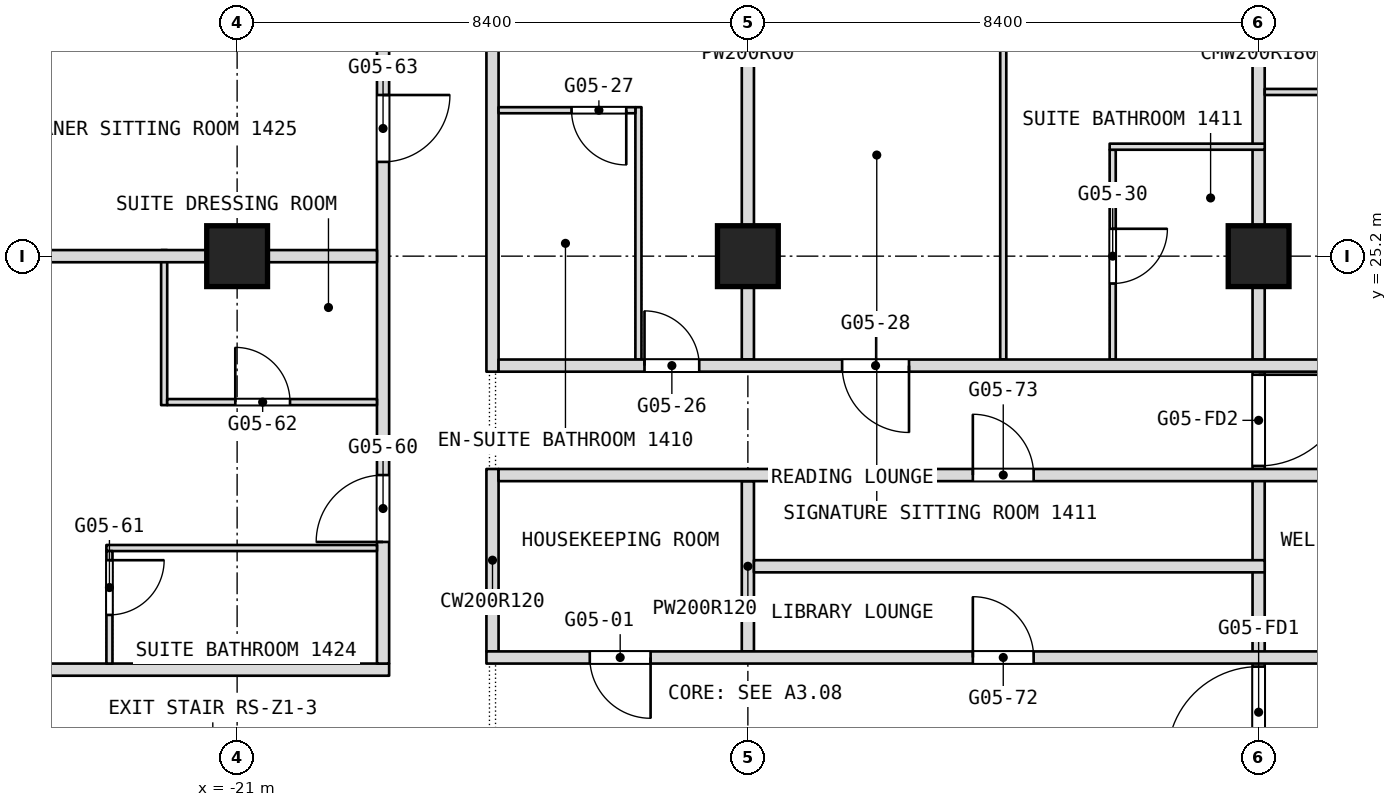
"""IFC4 building model, lengths in metres.
Left out: names, types, materials, properties, quantities, classifications, styles, units other than length and angle.
Written with IfcOpenShell. Run it as: python <this file> out.ifc"""

import sys

from ifc_helpers import new_model, si_unit, direction, frame, frame_2d, origin, origin_2d, place, context, subcontext, project, spatial, rectangle, extrude, element, fill, save


model = new_model("IFC4")
c1 = context("Model", 3, precision=1e-05, world=origin(), true_north=direction((0.0, 1.0)))
c2 = subcontext(c1, "Body", "Model", "MODEL_VIEW")
j1 = project(units=[si_unit("LENGTHUNIT", "METRE"), si_unit("PLANEANGLEUNIT", "RADIAN")], contexts=[c1])
p1 = place(None, origin())
s1 = spatial("IfcSite", under=j1, at=p1, CompositionType="ELEMENT")
p2 = place(p1, origin())
s2 = spatial("IfcBuilding", under=s1, at=p2, CompositionType="ELEMENT")
p3 = place(p2, frame((0.0, 0.0, 65.3)))
s3 = spatial("IfcBuildingStorey", under=s2, at=p3, CompositionType="ELEMENT", Elevation=65.3)
for number, where, z_axis, x_axis in (
    (1, (-21.0, 25.2, 0.0), (0.0, 0.0, 1.0), (1.0, 0.0, 0.0)),
    (2, (-12.6, 25.2, 0.0), (0.0, 0.0, 1.0), (1.0, 0.0, 0.0)),
    (3, (-4.2, 25.2, 0.0), (0.0, 0.0, 1.0), (1.0, 0.0, 0.0)),
):
    element("IfcColumn", number, at=place(p3, frame(where, z_axis=z_axis, x_axis=x_axis)), inside=s3, PredefinedType="COLUMN", context=c2, shape_type="SweptSolid", body=[
        extrude(rectangle(XDim=1.0, YDim=1.0, at=origin_2d()), origin(), (0.0, 0.0, 1.0), 3.6),
    ])
p4 = place(p3, frame((-4.2, 16.8, 0.0), z_axis=(0.0, 0.0, 1.0), x_axis=(0.0, 1.0, 0.0)))
e4 = element("IfcWall", 4, at=p4, inside=s3, PredefinedType="PARTITIONING", context=c2, shape_type="SweptSolid", body=[
    extrude(rectangle(XDim=6.7, YDim=0.2, at=frame_2d((3.35, 0.0))), origin(), (0.0, 0.0, 1.0), 3.34),
])
p5 = place(p4, frame((0.15, 0.0, 0.0)))
e5 = element("IfcOpeningElement", 5, at=p5, cuts=e4, PredefinedType="OPENING", context=c2, shape_type="SweptSolid", body=[
    extrude(rectangle(XDim=1.5, YDim=2.1, at=frame_2d((0.75, 1.05))), frame((0.0, 0.1, 0.0), z_axis=(0.0, -1.0, 0.0), x_axis=(1.0, 0.0, 0.0)), (0.0, 0.0, 1.0), 0.2),
])
p6 = place(p4, frame((4.95, 0.0, 0.0)))
e6 = element("IfcOpeningElement", 6, at=p6, cuts=e4, PredefinedType="OPENING", context=c2, shape_type="SweptSolid", body=[
    extrude(rectangle(XDim=1.5, YDim=2.1, at=frame_2d((0.75, 1.05))), frame((0.0, 0.1, 0.0), z_axis=(0.0, -1.0, 0.0), x_axis=(1.0, 0.0, 0.0)), (0.0, 0.0, 1.0), 0.2),
])
p7 = place(p3, frame((-4.2, 23.5, 0.0), z_axis=(0.0, 0.0, 1.0), x_axis=(0.0, 1.0, 0.0)))
e7 = element("IfcWall", 7, at=p7, inside=s3, PredefinedType="PARTITIONING", context=c2, shape_type="SweptSolid", body=[
    extrude(rectangle(XDim=10.04, YDim=0.2, at=frame_2d((5.02, 0.0))), origin(), (0.0, 0.0, 1.0), 3.34),
])
p8 = place(p3, frame((-6.6, 23.5, 0.0), z_axis=(0.0, 0.0, 1.0), x_axis=(0.0, 1.0, 0.0)))
e8 = element("IfcWall", 8, at=p8, inside=s3, PredefinedType="PARTITIONING", context=c2, shape_type="SweptSolid", body=[
    extrude(rectangle(XDim=3.45, YDim=0.1, at=frame_2d((1.725, 0.0))), origin(), (0.0, 0.0, 1.0), 3.34),
])
p9 = place(p8, frame((1.25, 0.0, 0.0)))
e9 = element("IfcOpeningElement", 9, at=p9, cuts=e8, PredefinedType="OPENING", context=c2, shape_type="SweptSolid", body=[
    extrude(rectangle(XDim=0.9, YDim=2.1, at=frame_2d((0.45, 1.05))), frame((0.0, 0.05, 0.0), z_axis=(0.0, -1.0, 0.0), x_axis=(1.0, 0.0, 0.0)), (0.0, 0.0, 1.0), 0.1),
])
p10 = place(p3, frame((-8.4, 23.5, 0.0), z_axis=(0.0, 0.0, 1.0), x_axis=(0.0, 1.0, 0.0)))
e10 = element("IfcWall", 10, at=p10, inside=s3, PredefinedType="PARTITIONING", context=c2, shape_type="SweptSolid", body=[
    extrude(rectangle(XDim=10.04, YDim=0.1, at=frame_2d((5.02, 0.0))), origin(), (0.0, 0.0, 1.0), 3.34),
])
p11 = place(p10, frame((5.57, 0.0, 0.0)))
e11 = element("IfcOpeningElement", 11, at=p11, cuts=e10, PredefinedType="OPENING", context=c2, shape_type="SweptSolid", body=[
    extrude(rectangle(XDim=0.9, YDim=2.1, at=frame_2d((0.45, 1.05))), frame((0.0, 0.05, 0.0), z_axis=(0.0, -1.0, 0.0), x_axis=(1.0, 0.0, 0.0)), (0.0, 0.0, 1.0), 0.1),
])
p12 = place(p3, frame((-12.6, 18.7, 0.0), z_axis=(0.0, 0.0, 1.0), x_axis=(0.0, 1.0, 0.0)))
e12 = element("IfcWall", 12, at=p12, inside=s3, PredefinedType="PARTITIONING", context=c2, shape_type="SweptSolid", body=[
    extrude(rectangle(XDim=2.8, YDim=0.2, at=frame_2d((1.4, 0.0))), origin(), (0.0, 0.0, 1.0), 3.34),
])
p13 = place(p3, frame((-12.6, 23.5, 0.0), z_axis=(0.0, 0.0, 1.0), x_axis=(0.0, 1.0, 0.0)))
e13 = element("IfcWall", 13, at=p13, inside=s3, PredefinedType="PARTITIONING", context=c2, shape_type="SweptSolid", body=[
    extrude(rectangle(XDim=10.04, YDim=0.2, at=frame_2d((5.02, 0.0))), origin(), (0.0, 0.0, 1.0), 3.34),
])
p14 = place(p3, frame((-14.4, 23.5, 0.0), z_axis=(0.0, 0.0, 1.0), x_axis=(0.0, 1.0, 0.0)))
e14 = element("IfcWall", 14, at=p14, inside=s3, PredefinedType="PARTITIONING", context=c2, shape_type="SweptSolid", body=[
    extrude(rectangle(XDim=4.15, YDim=0.1, at=frame_2d((2.075, 0.0))), origin(), (0.0, 0.0, 1.0), 3.34),
])
p15 = place(p3, frame((-16.8, 18.7, 0.0), z_axis=(0.0, 0.0, 1.0), x_axis=(0.0, 1.0, 0.0)))
e15 = element("IfcWall", 15, at=p15, inside=s3, PredefinedType="PARTITIONING", context=c2, shape_type="SweptSolid", body=[
    extrude(rectangle(XDim=3.0, YDim=0.2, at=frame_2d((1.5, 0.0))), origin(), (0.0, 0.0, 1.0), 3.34),
])
p16 = place(p3, frame((-16.8, 23.3, 0.0), z_axis=(0.0, 0.0, 1.0), x_axis=(0.0, 1.0, 0.0)))
e16 = element("IfcWall", 16, at=p16, inside=s3, PredefinedType="PARTITIONING", context=c2, shape_type="SweptSolid", body=[
    extrude(rectangle(XDim=10.24, YDim=0.2, at=frame_2d((5.12, 0.0))), origin(), (0.0, 0.0, 1.0), 3.34),
])
p17 = place(p3, frame((-24.5, 18.4, 0.0), z_axis=(0.0, 0.0, 1.0), x_axis=(1.0, 0.0, 0.0)))
e17 = element("IfcWall", 17, at=p17, inside=s3, PredefinedType="PARTITIONING", context=c2, shape_type="SweptSolid", body=[
    extrude(rectangle(XDim=6.0, YDim=0.2, at=frame_2d((3.0, 0.0))), origin(), (0.0, 0.0, 1.0), 3.34),
])
p18 = place(p3, frame((-18.6, 18.5, 0.0), z_axis=(0.0, 0.0, 1.0), x_axis=(0.0, 1.0, 0.0)))
e18 = element("IfcWall", 18, at=p18, inside=s3, PredefinedType="PARTITIONING", context=c2, shape_type="SweptSolid", body=[
    extrude(rectangle(XDim=15.04, YDim=0.2, at=frame_2d((7.52, 0.0))), origin(), (0.0, 0.0, 1.0), 3.34),
])
p19 = place(p18, frame((2.0, 0.0, 0.0)))
e19 = element("IfcOpeningElement", 19, at=p19, cuts=e18, PredefinedType="OPENING", context=c2, shape_type="SweptSolid", body=[
    extrude(rectangle(XDim=1.1, YDim=2.1, at=frame_2d((0.55, 1.05))), frame((0.0, 0.1, 0.0), z_axis=(0.0, -1.0, 0.0), x_axis=(1.0, 0.0, 0.0)), (0.0, 0.0, 1.0), 0.2),
])
p20 = place(p18, frame((8.25, 0.0, 0.0)))
e20 = element("IfcOpeningElement", 20, at=p20, cuts=e18, PredefinedType="OPENING", context=c2, shape_type="SweptSolid", body=[
    extrude(rectangle(XDim=1.1, YDim=2.1, at=frame_2d((0.55, 1.05))), frame((0.0, 0.1, 0.0), z_axis=(0.0, -1.0, 0.0), x_axis=(1.0, 0.0, 0.0)), (0.0, 0.0, 1.0), 0.2),
])
p21 = place(p3, frame((-16.9, 18.6, 0.0), z_axis=(0.0, 0.0, 1.0), x_axis=(1.0, 0.0, 0.0)))
e21 = element("IfcWall", 21, at=p21, inside=s3, PredefinedType="PARTITIONING", context=c2, shape_type="SweptSolid", body=[
    extrude(rectangle(XDim=25.1, YDim=0.2, at=frame_2d((12.55, 0.0))), origin(), (0.0, 0.0, 1.0), 3.34),
])
p22 = place(p21, frame((1.7, 0.0, 0.0)))
e22 = element("IfcOpeningElement", 22, at=p22, cuts=e21, PredefinedType="OPENING", context=c2, shape_type="SweptSolid", body=[
    extrude(rectangle(XDim=1.0, YDim=2.1, at=frame_2d((0.5, 1.05))), frame((0.0, 0.1, 0.0), z_axis=(0.0, -1.0, 0.0), x_axis=(1.0, 0.0, 0.0)), (0.0, 0.0, 1.0), 0.2),
])
p23 = place(p21, frame((8.0, 0.0, 0.0)))
e23 = element("IfcOpeningElement", 23, at=p23, cuts=e21, PredefinedType="OPENING", context=c2, shape_type="SweptSolid", body=[
    extrude(rectangle(XDim=1.0, YDim=2.1, at=frame_2d((0.5, 1.05))), frame((0.0, 0.1, 0.0), z_axis=(0.0, -1.0, 0.0), x_axis=(1.0, 0.0, 0.0)), (0.0, 0.0, 1.0), 0.2),
])
p24 = place(p21, frame((22.55, 0.0, 0.0)))
e24 = element("IfcOpeningElement", 24, at=p24, cuts=e21, PredefinedType="OPENING", context=c2, shape_type="SweptSolid", body=[
    extrude(rectangle(XDim=1.0, YDim=2.1, at=frame_2d((0.5, 1.05))), frame((0.0, 0.1, 0.0), z_axis=(0.0, -1.0, 0.0), x_axis=(1.0, 0.0, 0.0)), (0.0, 0.0, 1.0), 0.2),
])
p25 = place(p21, frame((14.3, 0.0, 0.0)))
e25 = element("IfcOpeningElement", 25, at=p25, cuts=e21, PredefinedType="OPENING", context=c2, shape_type="SweptSolid", body=[
    extrude(rectangle(XDim=1.0, YDim=2.1, at=frame_2d((0.5, 1.05))), frame((0.0, 0.1, 0.0), z_axis=(0.0, -1.0, 0.0), x_axis=(1.0, 0.0, 0.0)), (0.0, 0.0, 1.0), 0.2),
])
p26 = place(p21, frame((18.5, 0.0, 0.0)))
e26 = element("IfcOpeningElement", 26, at=p26, cuts=e21, PredefinedType="OPENING", context=c2, shape_type="SweptSolid", body=[
    extrude(rectangle(XDim=1.0, YDim=2.1, at=frame_2d((0.5, 1.05))), frame((0.0, 0.1, 0.0), z_axis=(0.0, -1.0, 0.0), x_axis=(1.0, 0.0, 0.0)), (0.0, 0.0, 1.0), 0.2),
])
p27 = place(p3, frame((-12.5, 20.1, 0.0), z_axis=(0.0, 0.0, 1.0), x_axis=(1.0, 0.0, 0.0)))
e27 = element("IfcWall", 27, at=p27, inside=s3, PredefinedType="PARTITIONING", context=c2, shape_type="SweptSolid", body=[
    extrude(rectangle(XDim=8.4, YDim=0.2, at=frame_2d((4.2, 0.0))), origin(), (0.0, 0.0, 1.0), 3.34),
])
p28 = place(p3, frame((-23.15, 20.4, 0.0), z_axis=(0.0, 0.0, 1.0), x_axis=(1.0, 0.0, 0.0)))
e28 = element("IfcWall", 28, at=p28, inside=s3, PredefinedType="PARTITIONING", context=c2, shape_type="SweptSolid", body=[
    extrude(rectangle(XDim=4.45, YDim=0.1, at=frame_2d((2.225, 0.0))), origin(), (0.0, 0.0, 1.0), 3.34),
])
p29 = place(p3, frame((-16.7, 21.6, 0.0), z_axis=(0.0, 0.0, 1.0), x_axis=(1.0, 0.0, 0.0)))
e29 = element("IfcWall", 29, at=p29, inside=s3, PredefinedType="PARTITIONING", context=c2, shape_type="SweptSolid", body=[
    extrude(rectangle(XDim=24.7, YDim=0.2, at=frame_2d((12.35, 0.0))), origin(), (0.0, 0.0, 1.0), 3.34),
])
p30 = place(p29, frame((7.8, 0.0, 0.0)))
e30 = element("IfcOpeningElement", 30, at=p30, cuts=e29, PredefinedType="OPENING", context=c2, shape_type="SweptSolid", body=[
    extrude(rectangle(XDim=1.0, YDim=2.1, at=frame_2d((0.5, 1.05))), frame((0.0, 0.1, 0.0), z_axis=(0.0, -1.0, 0.0), x_axis=(1.0, 0.0, 0.0)), (0.0, 0.0, 1.0), 0.2),
])
p31 = place(p29, frame((22.25, 0.0, 0.0)))
e31 = element("IfcOpeningElement", 31, at=p31, cuts=e29, PredefinedType="OPENING", context=c2, shape_type="SweptSolid", body=[
    extrude(rectangle(XDim=1.0, YDim=2.1, at=frame_2d((0.5, 1.05))), frame((0.0, 0.1, 0.0), z_axis=(0.0, -1.0, 0.0), x_axis=(1.0, 0.0, 0.0)), (0.0, 0.0, 1.0), 0.2),
])
p32 = place(p3, frame((-22.2, 22.75, 0.0), z_axis=(0.0, 0.0, 1.0), x_axis=(0.0, 1.0, 0.0)))
e32 = element("IfcWall", 32, at=p32, inside=s3, PredefinedType="PARTITIONING", context=c2, shape_type="SweptSolid", body=[
    extrude(rectangle(XDim=2.55, YDim=0.1, at=frame_2d((1.275, 0.0))), origin(), (0.0, 0.0, 1.0), 3.34),
])
p33 = place(p3, frame((-22.15, 22.8, 0.0), z_axis=(0.0, 0.0, 1.0), x_axis=(1.0, 0.0, 0.0)))
e33 = element("IfcWall", 33, at=p33, inside=s3, PredefinedType="PARTITIONING", context=c2, shape_type="SweptSolid", body=[
    extrude(rectangle(XDim=3.45, YDim=0.1, at=frame_2d((1.725, 0.0))), origin(), (0.0, 0.0, 1.0), 3.34),
])
p34 = place(p33, frame((1.12, 0.0, 0.0)))
e34 = element("IfcOpeningElement", 34, at=p34, cuts=e33, PredefinedType="OPENING", context=c2, shape_type="SweptSolid", body=[
    extrude(rectangle(XDim=0.9, YDim=2.1, at=frame_2d((0.45, 1.05))), frame((0.0, 0.05, 0.0), z_axis=(0.0, -1.0, 0.0), x_axis=(1.0, 0.0, 0.0)), (0.0, 0.0, 1.0), 0.1),
])
p35 = place(p3, frame((-23.1, 18.5, 0.0), z_axis=(0.0, 0.0, 1.0), x_axis=(0.0, 1.0, 0.0)))
e35 = element("IfcWall", 35, at=p35, inside=s3, PredefinedType="PARTITIONING", context=c2, shape_type="SweptSolid", body=[
    extrude(rectangle(XDim=1.85, YDim=0.1, at=frame_2d((0.925, 0.0))), origin(), (0.0, 0.0, 1.0), 3.34),
])
p36 = place(p35, frame((0.8, 0.0, 0.0)))
e36 = element("IfcOpeningElement", 36, at=p36, cuts=e35, PredefinedType="OPENING", context=c2, shape_type="SweptSolid", body=[
    extrude(rectangle(XDim=0.9, YDim=2.1, at=frame_2d((0.45, 1.05))), frame((0.0, 0.05, 0.0), z_axis=(0.0, -1.0, 0.0), x_axis=(1.0, 0.0, 0.0)), (0.0, 0.0, 1.0), 0.1),
])
p37 = place(p3, frame((-16.7, 23.4, 0.0), z_axis=(0.0, 0.0, 1.0), x_axis=(1.0, 0.0, 0.0)))
e37 = element("IfcWall", 37, at=p37, inside=s3, PredefinedType="PARTITIONING", context=c2, shape_type="SweptSolid", body=[
    extrude(rectangle(XDim=23.4, YDim=0.2, at=frame_2d((11.7, 0.0))), origin(), (0.0, 0.0, 1.0), 3.34),
])
p38 = place(p37, frame((2.4, 0.0, 0.0)))
e38 = element("IfcOpeningElement", 38, at=p38, cuts=e37, PredefinedType="OPENING", context=c2, shape_type="SweptSolid", body=[
    extrude(rectangle(XDim=0.9, YDim=2.1, at=frame_2d((0.45, 1.05))), frame((0.0, 0.1, 0.0), z_axis=(0.0, -1.0, 0.0), x_axis=(1.0, 0.0, 0.0)), (0.0, 0.0, 1.0), 0.2),
])
p39 = place(p37, frame((5.65, 0.0, 0.0)))
e39 = element("IfcOpeningElement", 39, at=p39, cuts=e37, PredefinedType="OPENING", context=c2, shape_type="SweptSolid", body=[
    extrude(rectangle(XDim=1.1, YDim=2.1, at=frame_2d((0.55, 1.05))), frame((0.0, 0.1, 0.0), z_axis=(0.0, -1.0, 0.0), x_axis=(1.0, 0.0, 0.0)), (0.0, 0.0, 1.0), 0.2),
])
p40 = place(p37, frame((16.2, 0.0, 0.0)))
e40 = element("IfcOpeningElement", 40, at=p40, cuts=e37, PredefinedType="OPENING", context=c2, shape_type="SweptSolid", body=[
    extrude(rectangle(XDim=1.1, YDim=2.1, at=frame_2d((0.55, 1.05))), frame((0.0, 0.1, 0.0), z_axis=(0.0, -1.0, 0.0), x_axis=(1.0, 0.0, 0.0)), (0.0, 0.0, 1.0), 0.2),
])
p41 = place(p3, frame((-29.7, 25.2, 0.0), z_axis=(0.0, 0.0, 1.0), x_axis=(1.0, 0.0, 0.0)))
e41 = element("IfcWall", 41, at=p41, inside=s3, PredefinedType="PARTITIONING", context=c2, shape_type="SweptSolid", body=[
    extrude(rectangle(XDim=11.0, YDim=0.2, at=frame_2d((5.5, 0.0))), origin(), (0.0, 0.0, 1.0), 2.84),
])
p42 = place(p3, frame((-6.65, 27.0, 0.0), z_axis=(0.0, 0.0, 1.0), x_axis=(1.0, 0.0, 0.0)))
e42 = element("IfcWall", 42, at=p42, inside=s3, PredefinedType="PARTITIONING", context=c2, shape_type="SweptSolid", body=[
    extrude(rectangle(XDim=2.55, YDim=0.1, at=frame_2d((1.275, 0.0))), origin(), (0.0, 0.0, 1.0), 3.34),
])
p43 = place(p3, frame((-16.7, 27.6, 0.0), z_axis=(0.0, 0.0, 1.0), x_axis=(1.0, 0.0, 0.0)))
e43 = element("IfcWall", 43, at=p43, inside=s3, PredefinedType="PARTITIONING", context=c2, shape_type="SweptSolid", body=[
    extrude(rectangle(XDim=2.25, YDim=0.1, at=frame_2d((1.125, 0.0))), origin(), (0.0, 0.0, 1.0), 3.34),
])
p44 = place(p43, frame((1.2, 0.0, 0.0)))
e44 = element("IfcOpeningElement", 44, at=p44, cuts=e43, PredefinedType="OPENING", context=c2, shape_type="SweptSolid", body=[
    extrude(rectangle(XDim=0.9, YDim=2.1, at=frame_2d((0.45, 1.05))), frame((0.0, 0.05, 0.0), z_axis=(0.0, -1.0, 0.0), x_axis=(1.0, 0.0, 0.0)), (0.0, 0.0, 1.0), 0.1),
])
p45 = place(p3, frame((-4.1, 27.9, 0.0), z_axis=(0.0, 0.0, 1.0), x_axis=(1.0, 0.0, 0.0)))
e45 = element("IfcWall", 45, at=p45, inside=s3, PredefinedType="PARTITIONING", context=c2, shape_type="SweptSolid", body=[
    extrude(rectangle(XDim=3.45, YDim=0.1, at=frame_2d((1.725, 0.0))), origin(), (0.0, 0.0, 1.0), 3.34),
])
p46 = place(p45, frame((2.4, 0.0, 0.0)))
e46 = element("IfcOpeningElement", 46, at=p46, cuts=e45, PredefinedType="OPENING", context=c2, shape_type="SweptSolid", body=[
    extrude(rectangle(XDim=0.9, YDim=2.1, at=frame_2d((0.45, 1.05))), frame((0.0, 0.05, 0.0), z_axis=(0.0, -1.0, 0.0), x_axis=(1.0, 0.0, 0.0)), (0.0, 0.0, 1.0), 0.1),
])
p47 = place(p9, origin())
e47 = element("IfcDoor", 47, at=p47, inside=s3, OperationType="SINGLE_SWING_RIGHT", PredefinedType="DOOR", context=c2, shape_type="SweptSolid", body=[
    extrude(rectangle(XDim=0.9, YDim=2.1, at=frame_2d((0.45, 1.05))), frame((0.0, 0.025, 0.0), z_axis=(0.0, -1.0, 0.0), x_axis=(1.0, 0.0, 0.0)), (0.0, 0.0, 1.0), 0.05),
])
fill(e9, e47)
p48 = place(p19, origin())
e48 = element("IfcDoor", 48, at=p48, inside=s3, OperationType="SINGLE_SWING_LEFT", PredefinedType="DOOR", context=c2, shape_type="SweptSolid", body=[
    extrude(rectangle(XDim=1.1, YDim=2.1, at=frame_2d((0.55, 1.05))), frame((0.0, 0.025, 0.0), z_axis=(0.0, -1.0, 0.0), x_axis=(1.0, 0.0, 0.0)), (0.0, 0.0, 1.0), 0.05),
])
fill(e19, e48)
p49 = place(p20, origin())
e49 = element("IfcDoor", 49, at=p49, inside=s3, OperationType="SINGLE_SWING_RIGHT", PredefinedType="DOOR", context=c2, shape_type="SweptSolid", body=[
    extrude(rectangle(XDim=1.1, YDim=2.1, at=frame_2d((0.55, 1.05))), frame((0.0, 0.025, 0.0), z_axis=(0.0, -1.0, 0.0), x_axis=(1.0, 0.0, 0.0)), (0.0, 0.0, 1.0), 0.05),
])
fill(e20, e49)
p50 = place(p22, origin())
e50 = element("IfcDoor", 50, at=p50, inside=s3, OperationType="SINGLE_SWING_RIGHT", PredefinedType="DOOR", context=c2, shape_type="SweptSolid", body=[
    extrude(rectangle(XDim=1.0, YDim=2.1, at=frame_2d((0.5, 1.05))), frame((0.0, 0.025, 0.0), z_axis=(0.0, -1.0, 0.0), x_axis=(1.0, 0.0, 0.0)), (0.0, 0.0, 1.0), 0.05),
])
fill(e22, e50)
p51 = place(p23, origin())
e51 = element("IfcDoor", 51, at=p51, inside=s3, OperationType="SINGLE_SWING_RIGHT", PredefinedType="DOOR", context=c2, shape_type="SweptSolid", body=[
    extrude(rectangle(XDim=1.0, YDim=2.1, at=frame_2d((0.5, 1.05))), frame((0.0, 0.025, 0.0), z_axis=(0.0, -1.0, 0.0), x_axis=(1.0, 0.0, 0.0)), (0.0, 0.0, 1.0), 0.05),
])
fill(e23, e51)
p52 = place(p30, origin())
e52 = element("IfcDoor", 52, at=p52, inside=s3, OperationType="SINGLE_SWING_RIGHT", PredefinedType="DOOR", context=c2, shape_type="SweptSolid", body=[
    extrude(rectangle(XDim=1.0, YDim=2.1, at=frame_2d((0.5, 1.05))), frame((0.0, 0.025, 0.0), z_axis=(0.0, -1.0, 0.0), x_axis=(1.0, 0.0, 0.0)), (0.0, 0.0, 1.0), 0.05),
])
fill(e30, e52)
p53 = place(p34, origin())
e53 = element("IfcDoor", 53, at=p53, inside=s3, OperationType="SINGLE_SWING_LEFT", PredefinedType="DOOR", context=c2, shape_type="SweptSolid", body=[
    extrude(rectangle(XDim=0.9, YDim=2.1, at=frame_2d((0.45, 1.05))), frame((0.0, 0.025, 0.0), z_axis=(0.0, -1.0, 0.0), x_axis=(1.0, 0.0, 0.0)), (0.0, 0.0, 1.0), 0.05),
])
fill(e34, e53)
p54 = place(p36, origin())
e54 = element("IfcDoor", 54, at=p54, inside=s3, OperationType="SINGLE_SWING_LEFT", PredefinedType="DOOR", context=c2, shape_type="SweptSolid", body=[
    extrude(rectangle(XDim=0.9, YDim=2.1, at=frame_2d((0.45, 1.05))), frame((0.0, 0.025, 0.0), z_axis=(0.0, -1.0, 0.0), x_axis=(1.0, 0.0, 0.0)), (0.0, 0.0, 1.0), 0.05),
])
fill(e36, e54)
p55 = place(p38, origin())
e55 = element("IfcDoor", 55, at=p55, inside=s3, OperationType="SINGLE_SWING_LEFT", PredefinedType="DOOR", context=c2, shape_type="SweptSolid", body=[
    extrude(rectangle(XDim=0.9, YDim=2.1, at=frame_2d((0.45, 1.05))), frame((0.0, 0.025, 0.0), z_axis=(0.0, -1.0, 0.0), x_axis=(1.0, 0.0, 0.0)), (0.0, 0.0, 1.0), 0.05),
])
fill(e38, e55)
p56 = place(p39, origin())
e56 = element("IfcDoor", 56, at=p56, inside=s3, OperationType="SINGLE_SWING_LEFT", PredefinedType="DOOR", context=c2, shape_type="SweptSolid", body=[
    extrude(rectangle(XDim=1.1, YDim=2.1, at=frame_2d((0.55, 1.05))), frame((0.0, 0.025, 0.0), z_axis=(0.0, -1.0, 0.0), x_axis=(1.0, 0.0, 0.0)), (0.0, 0.0, 1.0), 0.05),
])
fill(e39, e56)
p57 = place(p44, origin())
e57 = element("IfcDoor", 57, at=p57, inside=s3, OperationType="SINGLE_SWING_LEFT", PredefinedType="DOOR", context=c2, shape_type="SweptSolid", body=[
    extrude(rectangle(XDim=0.9, YDim=2.1, at=frame_2d((0.45, 1.05))), frame((0.0, 0.025, 0.0), z_axis=(0.0, -1.0, 0.0), x_axis=(1.0, 0.0, 0.0)), (0.0, 0.0, 1.0), 0.05),
])
fill(e44, e57)
p58 = place(p5, origin())
e58 = element("IfcDoor", 58, at=p58, inside=s3, OperationType="DOUBLE_DOOR_DOUBLE_SWING", PredefinedType="DOOR", context=c2, shape_type="SweptSolid", body=[
    extrude(rectangle(XDim=1.5, YDim=2.1, at=frame_2d((0.75, 1.05))), frame((0.0, 0.025, 0.0), z_axis=(0.0, -1.0, 0.0), x_axis=(1.0, 0.0, 0.0)), (0.0, 0.0, 1.0), 0.05),
])
fill(e5, e58)
p59 = place(p6, origin())
e59 = element("IfcDoor", 59, at=p59, inside=s3, OperationType="DOUBLE_DOOR_DOUBLE_SWING", PredefinedType="DOOR", context=c2, shape_type="SweptSolid", body=[
    extrude(rectangle(XDim=1.5, YDim=2.1, at=frame_2d((0.75, 1.05))), frame((0.0, 0.025, 0.0), z_axis=(0.0, -1.0, 0.0), x_axis=(1.0, 0.0, 0.0)), (0.0, 0.0, 1.0), 0.05),
])
fill(e6, e59)
save(model, sys.argv[1])
